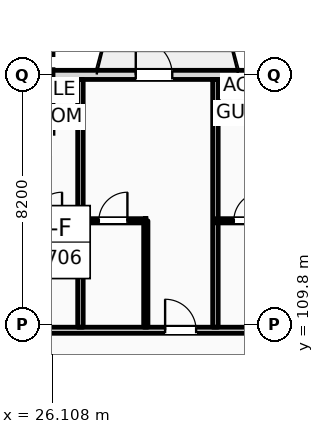
"""IFC4 building model, lengths in metres.
Left out: names, types, materials, properties, quantities, classifications, styles, units other than length and angle.
Written with IfcOpenShell. Run it as: python <this file> out.ifc"""

import sys

from ifc_helpers import new_model, si_unit, direction, frame, frame_2d, origin, place, context, subcontext, project, spatial, rectangle, extrude, element, fill, save


model = new_model("IFC4")
c1 = context("Model", 3, precision=1e-05, world=origin(), true_north=direction((0.0, 1.0)))
c2 = subcontext(c1, "Body", "Model", "MODEL_VIEW")
j1 = project(units=[si_unit("LENGTHUNIT", "METRE"), si_unit("PLANEANGLEUNIT", "RADIAN")], contexts=[c1])
p1 = place(None, origin())
s1 = spatial("IfcSite", under=j1, at=p1, CompositionType="ELEMENT")
p2 = place(p1, origin())
s2 = spatial("IfcBuilding", under=s1, at=p2, CompositionType="ELEMENT")
p3 = place(p2, frame((0.0, 0.0, 20.4)))
s3 = spatial("IfcBuildingStorey", under=s2, at=p3, CompositionType="ELEMENT", Elevation=20.4)
p4 = place(p3, frame((22.5, 118.0, 0.0), z_axis=(0.0, 0.0, 1.0), x_axis=(1.0, 0.0, 0.0)))
e1 = element("IfcWall", 1, at=p4, inside=s3, PredefinedType="STANDARD", context=c2, shape_type="SweptSolid", body=[
    extrude(rectangle(XDim=97.5, YDim=0.3, at=frame_2d((48.75, 0.0))), origin(), (0.0, 0.0, 1.0), 3.38),
])
p5 = place(p4, frame((0.91, 0.0, 0.9)))
e2 = element("IfcOpeningElement", 2, at=p5, cuts=e1, PredefinedType="OPENING", context=c2, shape_type="SweptSolid", body=[
    extrude(rectangle(XDim=0.9, YDim=1.8, at=frame_2d((0.45, 0.9))), frame((0.0, 0.16, 0.0), z_axis=(0.0, -1.0, 0.0), x_axis=(1.0, 0.0, 0.0)), (0.0, 0.0, 1.0), 0.32),
])
p6 = place(p4, frame((6.36, 0.0, 0.0)))
e3 = element("IfcOpeningElement", 3, at=p6, cuts=e1, PredefinedType="OPENING", context=c2, shape_type="SweptSolid", body=[
    extrude(rectangle(XDim=1.2, YDim=2.25, at=frame_2d((0.6, 1.125))), frame((0.0, 0.16, 0.0), z_axis=(0.0, -1.0, 0.0), x_axis=(1.0, 0.0, 0.0)), (0.0, 0.0, 1.0), 0.32),
])
p7 = place(p4, frame((11.41, 0.0, 0.9)))
e4 = element("IfcOpeningElement", 4, at=p7, cuts=e1, PredefinedType="OPENING", context=c2, shape_type="SweptSolid", body=[
    extrude(rectangle(XDim=1.1, YDim=1.9, at=frame_2d((0.55, 0.95))), frame((0.0, 0.16, 0.0), z_axis=(0.0, -1.0, 0.0), x_axis=(1.0, 0.0, 0.0)), (0.0, 0.0, 1.0), 0.32),
])
p8 = place(p4, frame((14.335, 0.0, 0.9)))
e5 = element("IfcOpeningElement", 5, at=p8, cuts=e1, PredefinedType="OPENING", context=c2, shape_type="SweptSolid", body=[
    extrude(rectangle(XDim=1.65, YDim=1.95, at=frame_2d((0.825, 0.975))), frame((0.0, 0.16, 0.0), z_axis=(0.0, -1.0, 0.0), x_axis=(1.0, 0.0, 0.0)), (0.0, 0.0, 1.0), 0.32),
])
p9 = place(p4, frame((19.26, 0.0, 0.9)))
e6 = element("IfcOpeningElement", 6, at=p9, cuts=e1, PredefinedType="OPENING", context=c2, shape_type="SweptSolid", body=[
    extrude(rectangle(XDim=1.35, YDim=2.0, at=frame_2d((0.675, 1.0))), frame((0.0, 0.16, 0.0), z_axis=(0.0, -1.0, 0.0), x_axis=(1.0, 0.0, 0.0)), (0.0, 0.0, 1.0), 0.32),
])
p10 = place(p4, frame((22.8, 0.0, 0.0)))
e7 = element("IfcOpeningElement", 7, at=p10, cuts=e1, PredefinedType="OPENING", context=c2, shape_type="SweptSolid", body=[
    extrude(rectangle(XDim=1.2, YDim=2.25, at=frame_2d((0.6, 1.125))), frame((0.0, 0.16, 0.0), z_axis=(0.0, -1.0, 0.0), x_axis=(1.0, 0.0, 0.0)), (0.0, 0.0, 1.0), 0.32),
])
p11 = place(p4, frame((26.91, 0.0, 0.9)))
e8 = element("IfcOpeningElement", 8, at=p11, cuts=e1, PredefinedType="OPENING", context=c2, shape_type="SweptSolid", body=[
    extrude(rectangle(XDim=2.1, YDim=2.1, at=frame_2d((1.05, 1.05))), frame((0.0, 0.16, 0.0), z_axis=(0.0, -1.0, 0.0), x_axis=(1.0, 0.0, 0.0)), (0.0, 0.0, 1.0), 0.32),
])
p12 = place(p4, frame((30.835, 0.0, 0.9)))
e9 = element("IfcOpeningElement", 9, at=p12, cuts=e1, PredefinedType="OPENING", context=c2, shape_type="SweptSolid", body=[
    extrude(rectangle(XDim=2.25, YDim=2.15, at=frame_2d((1.125, 1.075))), frame((0.0, 0.16, 0.0), z_axis=(0.0, -1.0, 0.0), x_axis=(1.0, 0.0, 0.0)), (0.0, 0.0, 1.0), 0.32),
])
p13 = place(p4, frame((34.96, 0.0, 0.9)))
e10 = element("IfcOpeningElement", 10, at=p13, cuts=e1, PredefinedType="OPENING", context=c2, shape_type="SweptSolid", body=[
    extrude(rectangle(XDim=2.4, YDim=2.2, at=frame_2d((1.2, 1.1))), frame((0.0, 0.16, 0.0), z_axis=(0.0, -1.0, 0.0), x_axis=(1.0, 0.0, 0.0)), (0.0, 0.0, 1.0), 0.32),
])
p14 = place(p4, frame((39.0, 0.0, 0.0)))
e11 = element("IfcOpeningElement", 11, at=p14, cuts=e1, PredefinedType="OPENING", context=c2, shape_type="SweptSolid", body=[
    extrude(rectangle(XDim=1.2, YDim=2.25, at=frame_2d((0.6, 1.125))), frame((0.0, 0.16, 0.0), z_axis=(0.0, -1.0, 0.0), x_axis=(1.0, 0.0, 0.0)), (0.0, 0.0, 1.0), 0.32),
])
p15 = place(p4, frame((43.21, 0.0, 0.9)))
e12 = element("IfcOpeningElement", 12, at=p15, cuts=e1, PredefinedType="OPENING", context=c2, shape_type="SweptSolid", body=[
    extrude(rectangle(XDim=2.7, YDim=2.3, at=frame_2d((1.35, 1.15))), frame((0.0, 0.16, 0.0), z_axis=(0.0, -1.0, 0.0), x_axis=(1.0, 0.0, 0.0)), (0.0, 0.0, 1.0), 0.32),
])
p16 = place(p4, frame((47.335, 0.0, 0.9)))
e13 = element("IfcOpeningElement", 13, at=p16, cuts=e1, PredefinedType="OPENING", context=c2, shape_type="SweptSolid", body=[
    extrude(rectangle(XDim=1.35, YDim=2.3, at=frame_2d((0.675, 1.15))), frame((0.0, 0.16, 0.0), z_axis=(0.0, -1.0, 0.0), x_axis=(1.0, 0.0, 0.0)), (0.0, 0.0, 1.0), 0.32),
])
p17 = place(p4, frame((52.74, 0.0, 0.0)))
e14 = element("IfcOpeningElement", 14, at=p17, cuts=e1, PredefinedType="OPENING", context=c2, shape_type="SweptSolid", body=[
    extrude(rectangle(XDim=1.2, YDim=2.25, at=frame_2d((0.6, 1.125))), frame((0.0, 0.16, 0.0), z_axis=(0.0, -1.0, 0.0), x_axis=(1.0, 0.0, 0.0)), (0.0, 0.0, 1.0), 0.32),
])
p18 = place(p4, frame((55.36, 0.0, 0.9)))
e15 = element("IfcOpeningElement", 15, at=p18, cuts=e1, PredefinedType="OPENING", context=c2, shape_type="SweptSolid", body=[
    extrude(rectangle(XDim=1.1, YDim=2.3, at=frame_2d((0.55, 1.15))), frame((0.0, 0.16, 0.0), z_axis=(0.0, -1.0, 0.0), x_axis=(1.0, 0.0, 0.0)), (0.0, 0.0, 1.0), 0.32),
])
p19 = place(p4, frame((59.99, 0.0, 0.9)))
e16 = element("IfcOpeningElement", 16, at=p19, cuts=e1, PredefinedType="OPENING", context=c2, shape_type="SweptSolid", body=[
    extrude(rectangle(XDim=2.74, YDim=2.3, at=frame_2d((1.37, 1.15))), frame((0.0, 0.16, 0.0), z_axis=(0.0, -1.0, 0.0), x_axis=(1.0, 0.0, 0.0)), (0.0, 0.0, 1.0), 0.32),
])
p20 = place(p4, frame((65.95, 0.0, 0.9)))
e17 = element("IfcOpeningElement", 17, at=p20, cuts=e1, PredefinedType="OPENING", context=c2, shape_type="SweptSolid", body=[
    extrude(rectangle(XDim=1.35, YDim=2.3, at=frame_2d((0.675, 1.15))), frame((0.0, 0.16, 0.0), z_axis=(0.0, -1.0, 0.0), x_axis=(1.0, 0.0, 0.0)), (0.0, 0.0, 1.0), 0.32),
])
p21 = place(p4, frame((69.16, 0.0, 0.0)))
e18 = element("IfcOpeningElement", 18, at=p21, cuts=e1, PredefinedType="OPENING", context=c2, shape_type="SweptSolid", body=[
    extrude(rectangle(XDim=1.2, YDim=2.25, at=frame_2d((0.6, 1.125))), frame((0.0, 0.16, 0.0), z_axis=(0.0, -1.0, 0.0), x_axis=(1.0, 0.0, 0.0)), (0.0, 0.0, 1.0), 0.32),
])
p22 = place(p4, frame((73.75, 0.0, 0.9)))
e19 = element("IfcOpeningElement", 19, at=p22, cuts=e1, PredefinedType="OPENING", context=c2, shape_type="SweptSolid", body=[
    extrude(rectangle(XDim=1.8, YDim=2.3, at=frame_2d((0.9, 1.15))), frame((0.0, 0.16, 0.0), z_axis=(0.0, -1.0, 0.0), x_axis=(1.0, 0.0, 0.0)), (0.0, 0.0, 1.0), 0.32),
])
p23 = place(p4, frame((76.79, 0.0, 0.9)))
e20 = element("IfcOpeningElement", 20, at=p23, cuts=e1, PredefinedType="OPENING", context=c2, shape_type="SweptSolid", body=[
    extrude(rectangle(XDim=2.74, YDim=2.3, at=frame_2d((1.37, 1.15))), frame((0.0, 0.16, 0.0), z_axis=(0.0, -1.0, 0.0), x_axis=(1.0, 0.0, 0.0)), (0.0, 0.0, 1.0), 0.32),
])
p24 = place(p4, frame((81.55, 0.0, 0.9)))
e21 = element("IfcOpeningElement", 21, at=p24, cuts=e1, PredefinedType="OPENING", context=c2, shape_type="SweptSolid", body=[
    extrude(rectangle(XDim=1.8, YDim=2.3, at=frame_2d((0.9, 1.15))), frame((0.0, 0.16, 0.0), z_axis=(0.0, -1.0, 0.0), x_axis=(1.0, 0.0, 0.0)), (0.0, 0.0, 1.0), 0.32),
])
p25 = place(p4, frame((86.01, 0.0, 0.9)))
e22 = element("IfcOpeningElement", 22, at=p25, cuts=e1, PredefinedType="OPENING", context=c2, shape_type="SweptSolid", body=[
    extrude(rectangle(XDim=1.1, YDim=1.5, at=frame_2d((0.55, 0.75))), frame((0.0, 0.16, 0.0), z_axis=(0.0, -1.0, 0.0), x_axis=(1.0, 0.0, 0.0)), (0.0, 0.0, 1.0), 0.32),
])
p26 = place(p4, frame((90.135, 0.0, 0.9)))
e23 = element("IfcOpeningElement", 23, at=p26, cuts=e1, PredefinedType="OPENING", context=c2, shape_type="SweptSolid", body=[
    extrude(rectangle(XDim=1.25, YDim=1.6, at=frame_2d((0.625, 0.8))), frame((0.0, 0.16, 0.0), z_axis=(0.0, -1.0, 0.0), x_axis=(1.0, 0.0, 0.0)), (0.0, 0.0, 1.0), 0.32),
])
p27 = place(p4, frame((94.34, 0.0, 0.9)))
e24 = element("IfcOpeningElement", 24, at=p27, cuts=e1, PredefinedType="OPENING", context=c2, shape_type="SweptSolid", body=[
    extrude(rectangle(XDim=1.4, YDim=1.7, at=frame_2d((0.7, 0.85))), frame((0.0, 0.16, 0.0), z_axis=(0.0, -1.0, 0.0), x_axis=(1.0, 0.0, 0.0)), (0.0, 0.0, 1.0), 0.32),
])
p28 = place(p3, frame((10.65, 109.6, 0.0), z_axis=(0.0, 0.0, 1.0), x_axis=(1.0, 0.0, 0.0)))
e25 = element("IfcWall", 25, at=p28, inside=s3, PredefinedType="PARTITIONING", context=c2, shape_type="SweptSolid", body=[
    extrude(rectangle(XDim=109.21, YDim=0.2, at=frame_2d((54.605, 0.0))), origin(), (0.0, 0.0, 1.0), 3.38),
])
p29 = place(p28, frame((12.535, 0.0, 0.0)))
e26 = element("IfcOpeningElement", 26, at=p29, cuts=e25, PredefinedType="OPENING", context=c2, shape_type="SweptSolid", body=[
    extrude(rectangle(XDim=1.02, YDim=2.2, at=frame_2d((0.51, 1.1))), frame((0.0, 0.11, 0.0), z_axis=(0.0, -1.0, 0.0), x_axis=(1.0, 0.0, 0.0)), (0.0, 0.0, 1.0), 0.22),
])
p30 = place(p28, frame((19.175, 0.0, 0.0)))
e27 = element("IfcOpeningElement", 27, at=p30, cuts=e25, PredefinedType="OPENING", context=c2, shape_type="SweptSolid", body=[
    extrude(rectangle(XDim=1.02, YDim=2.2, at=frame_2d((0.51, 1.1))), frame((0.0, 0.11, 0.0), z_axis=(0.0, -1.0, 0.0), x_axis=(1.0, 0.0, 0.0)), (0.0, 0.0, 1.0), 0.22),
])
p31 = place(p28, frame((23.375, 0.0, 0.0)))
e28 = element("IfcOpeningElement", 28, at=p31, cuts=e25, PredefinedType="OPENING", context=c2, shape_type="SweptSolid", body=[
    extrude(rectangle(XDim=1.02, YDim=2.2, at=frame_2d((0.51, 1.1))), frame((0.0, 0.11, 0.0), z_axis=(0.0, -1.0, 0.0), x_axis=(1.0, 0.0, 0.0)), (0.0, 0.0, 1.0), 0.22),
])
p32 = place(p28, frame((27.575, 0.0, 0.0)))
e29 = element("IfcOpeningElement", 29, at=p32, cuts=e25, PredefinedType="OPENING", context=c2, shape_type="SweptSolid", body=[
    extrude(rectangle(XDim=1.02, YDim=2.2, at=frame_2d((0.51, 1.1))), frame((0.0, 0.11, 0.0), z_axis=(0.0, -1.0, 0.0), x_axis=(1.0, 0.0, 0.0)), (0.0, 0.0, 1.0), 0.22),
])
p33 = place(p28, frame((31.805, 0.0, 0.0)))
e30 = element("IfcOpeningElement", 30, at=p33, cuts=e25, PredefinedType="OPENING", context=c2, shape_type="SweptSolid", body=[
    extrude(rectangle(XDim=0.96, YDim=2.2, at=frame_2d((0.48, 1.1))), frame((0.0, 0.11, 0.0), z_axis=(0.0, -1.0, 0.0), x_axis=(1.0, 0.0, 0.0)), (0.0, 0.0, 1.0), 0.22),
])
p34 = place(p28, frame((33.855, 0.0, 0.0)))
e31 = element("IfcOpeningElement", 31, at=p34, cuts=e25, PredefinedType="OPENING", context=c2, shape_type="SweptSolid", body=[
    extrude(rectangle(XDim=0.96, YDim=2.2, at=frame_2d((0.48, 1.1))), frame((0.0, 0.11, 0.0), z_axis=(0.0, -1.0, 0.0), x_axis=(1.0, 0.0, 0.0)), (0.0, 0.0, 1.0), 0.22),
])
p35 = place(p28, frame((40.205, 0.0, 0.0)))
e32 = element("IfcOpeningElement", 32, at=p35, cuts=e25, PredefinedType="OPENING", context=c2, shape_type="SweptSolid", body=[
    extrude(rectangle(XDim=0.96, YDim=2.2, at=frame_2d((0.48, 1.1))), frame((0.0, 0.11, 0.0), z_axis=(0.0, -1.0, 0.0), x_axis=(1.0, 0.0, 0.0)), (0.0, 0.0, 1.0), 0.22),
])
p36 = place(p28, frame((42.255, 0.0, 0.0)))
e33 = element("IfcOpeningElement", 33, at=p36, cuts=e25, PredefinedType="OPENING", context=c2, shape_type="SweptSolid", body=[
    extrude(rectangle(XDim=0.96, YDim=2.2, at=frame_2d((0.48, 1.1))), frame((0.0, 0.11, 0.0), z_axis=(0.0, -1.0, 0.0), x_axis=(1.0, 0.0, 0.0)), (0.0, 0.0, 1.0), 0.22),
])
p37 = place(p28, frame((48.605, 0.0, 0.0)))
e34 = element("IfcOpeningElement", 34, at=p37, cuts=e25, PredefinedType="OPENING", context=c2, shape_type="SweptSolid", body=[
    extrude(rectangle(XDim=0.96, YDim=2.2, at=frame_2d((0.48, 1.1))), frame((0.0, 0.11, 0.0), z_axis=(0.0, -1.0, 0.0), x_axis=(1.0, 0.0, 0.0)), (0.0, 0.0, 1.0), 0.22),
])
p38 = place(p28, frame((50.655, 0.0, 0.0)))
e35 = element("IfcOpeningElement", 35, at=p38, cuts=e25, PredefinedType="OPENING", context=c2, shape_type="SweptSolid", body=[
    extrude(rectangle(XDim=0.96, YDim=2.2, at=frame_2d((0.48, 1.1))), frame((0.0, 0.11, 0.0), z_axis=(0.0, -1.0, 0.0), x_axis=(1.0, 0.0, 0.0)), (0.0, 0.0, 1.0), 0.22),
])
p39 = place(p28, frame((57.005, 0.0, 0.0)))
e36 = element("IfcOpeningElement", 36, at=p39, cuts=e25, PredefinedType="OPENING", context=c2, shape_type="SweptSolid", body=[
    extrude(rectangle(XDim=0.96, YDim=2.2, at=frame_2d((0.48, 1.1))), frame((0.0, 0.11, 0.0), z_axis=(0.0, -1.0, 0.0), x_axis=(1.0, 0.0, 0.0)), (0.0, 0.0, 1.0), 0.22),
])
p40 = place(p28, frame((59.055, 0.0, 0.0)))
e37 = element("IfcOpeningElement", 37, at=p40, cuts=e25, PredefinedType="OPENING", context=c2, shape_type="SweptSolid", body=[
    extrude(rectangle(XDim=0.96, YDim=2.2, at=frame_2d((0.48, 1.1))), frame((0.0, 0.11, 0.0), z_axis=(0.0, -1.0, 0.0), x_axis=(1.0, 0.0, 0.0)), (0.0, 0.0, 1.0), 0.22),
])
p41 = place(p28, frame((65.405, 0.0, 0.0)))
e38 = element("IfcOpeningElement", 38, at=p41, cuts=e25, PredefinedType="OPENING", context=c2, shape_type="SweptSolid", body=[
    extrude(rectangle(XDim=0.96, YDim=2.2, at=frame_2d((0.48, 1.1))), frame((0.0, 0.11, 0.0), z_axis=(0.0, -1.0, 0.0), x_axis=(1.0, 0.0, 0.0)), (0.0, 0.0, 1.0), 0.22),
])
p42 = place(p28, frame((67.205, 0.0, 0.0)))
e39 = element("IfcOpeningElement", 39, at=p42, cuts=e25, PredefinedType="OPENING", context=c2, shape_type="SweptSolid", body=[
    extrude(rectangle(XDim=0.96, YDim=2.2, at=frame_2d((0.48, 1.1))), frame((0.0, 0.11, 0.0), z_axis=(0.0, -1.0, 0.0), x_axis=(1.0, 0.0, 0.0)), (0.0, 0.0, 1.0), 0.22),
])
p43 = place(p28, frame((73.805, 0.0, 0.0)))
e40 = element("IfcOpeningElement", 40, at=p43, cuts=e25, PredefinedType="OPENING", context=c2, shape_type="SweptSolid", body=[
    extrude(rectangle(XDim=0.96, YDim=2.2, at=frame_2d((0.48, 1.1))), frame((0.0, 0.11, 0.0), z_axis=(0.0, -1.0, 0.0), x_axis=(1.0, 0.0, 0.0)), (0.0, 0.0, 1.0), 0.22),
])
p44 = place(p28, frame((78.255, 0.0, 0.0)))
e41 = element("IfcOpeningElement", 41, at=p44, cuts=e25, PredefinedType="OPENING", context=c2, shape_type="SweptSolid", body=[
    extrude(rectangle(XDim=0.96, YDim=2.2, at=frame_2d((0.48, 1.1))), frame((0.0, 0.11, 0.0), z_axis=(0.0, -1.0, 0.0), x_axis=(1.0, 0.0, 0.0)), (0.0, 0.0, 1.0), 0.22),
])
p45 = place(p28, frame((82.205, 0.0, 0.0)))
e42 = element("IfcOpeningElement", 42, at=p45, cuts=e25, PredefinedType="OPENING", context=c2, shape_type="SweptSolid", body=[
    extrude(rectangle(XDim=0.96, YDim=2.2, at=frame_2d((0.48, 1.1))), frame((0.0, 0.11, 0.0), z_axis=(0.0, -1.0, 0.0), x_axis=(1.0, 0.0, 0.0)), (0.0, 0.0, 1.0), 0.22),
])
p46 = place(p28, frame((86.405, 0.0, 0.0)))
e43 = element("IfcOpeningElement", 43, at=p46, cuts=e25, PredefinedType="OPENING", context=c2, shape_type="SweptSolid", body=[
    extrude(rectangle(XDim=0.96, YDim=2.2, at=frame_2d((0.48, 1.1))), frame((0.0, 0.11, 0.0), z_axis=(0.0, -1.0, 0.0), x_axis=(1.0, 0.0, 0.0)), (0.0, 0.0, 1.0), 0.22),
])
p47 = place(p28, frame((90.605, 0.0, 0.0)))
e44 = element("IfcOpeningElement", 44, at=p47, cuts=e25, PredefinedType="OPENING", context=c2, shape_type="SweptSolid", body=[
    extrude(rectangle(XDim=0.96, YDim=2.2, at=frame_2d((0.48, 1.1))), frame((0.0, 0.11, 0.0), z_axis=(0.0, -1.0, 0.0), x_axis=(1.0, 0.0, 0.0)), (0.0, 0.0, 1.0), 0.22),
])
p48 = place(p28, frame((94.805, 0.0, 0.0)))
e45 = element("IfcOpeningElement", 45, at=p48, cuts=e25, PredefinedType="OPENING", context=c2, shape_type="SweptSolid", body=[
    extrude(rectangle(XDim=0.96, YDim=2.2, at=frame_2d((0.48, 1.1))), frame((0.0, 0.11, 0.0), z_axis=(0.0, -1.0, 0.0), x_axis=(1.0, 0.0, 0.0)), (0.0, 0.0, 1.0), 0.22),
])
p49 = place(p28, frame((99.005, 0.0, 0.0)))
e46 = element("IfcOpeningElement", 46, at=p49, cuts=e25, PredefinedType="OPENING", context=c2, shape_type="SweptSolid", body=[
    extrude(rectangle(XDim=0.96, YDim=2.2, at=frame_2d((0.48, 1.1))), frame((0.0, 0.11, 0.0), z_axis=(0.0, -1.0, 0.0), x_axis=(1.0, 0.0, 0.0)), (0.0, 0.0, 1.0), 0.22),
])
p50 = place(p28, frame((103.205, 0.0, 0.0)))
e47 = element("IfcOpeningElement", 47, at=p50, cuts=e25, PredefinedType="OPENING", context=c2, shape_type="SweptSolid", body=[
    extrude(rectangle(XDim=0.96, YDim=2.2, at=frame_2d((0.48, 1.1))), frame((0.0, 0.11, 0.0), z_axis=(0.0, -1.0, 0.0), x_axis=(1.0, 0.0, 0.0)), (0.0, 0.0, 1.0), 0.22),
])
p51 = place(p28, frame((105.335, 0.0, 0.0)))
e48 = element("IfcOpeningElement", 48, at=p51, cuts=e25, PredefinedType="OPENING", context=c2, shape_type="SweptSolid", body=[
    extrude(rectangle(XDim=0.96, YDim=2.2, at=frame_2d((0.48, 1.1))), frame((0.0, 0.11, 0.0), z_axis=(0.0, -1.0, 0.0), x_axis=(1.0, 0.0, 0.0)), (0.0, 0.0, 1.0), 0.22),
])
p52 = place(p28, frame((2.716, 0.0, 0.0)))
e49 = element("IfcOpeningElement", 49, at=p52, cuts=e25, PredefinedType="OPENING", context=c2, shape_type="SweptSolid", body=[
    extrude(rectangle(XDim=1.35, YDim=2.25, at=frame_2d((0.675, 1.125))), frame((0.0, 0.11, 0.0), z_axis=(0.0, -1.0, 0.0), x_axis=(1.0, 0.0, 0.0)), (0.0, 0.0, 1.0), 0.22),
])
p53 = place(p28, frame((6.65, 0.0, 0.0)))
e50 = element("IfcOpeningElement", 50, at=p53, cuts=e25, PredefinedType="OPENING", context=c2, shape_type="SweptSolid", body=[
    extrude(rectangle(XDim=1.35, YDim=2.25, at=frame_2d((0.675, 1.125))), frame((0.0, 0.11, 0.0), z_axis=(0.0, -1.0, 0.0), x_axis=(1.0, 0.0, 0.0)), (0.0, 0.0, 1.0), 0.22),
])
p54 = place(p28, frame((10.583, 0.0, 0.0)))
e51 = element("IfcOpeningElement", 51, at=p54, cuts=e25, PredefinedType="OPENING", context=c2, shape_type="SweptSolid", body=[
    extrude(rectangle(XDim=1.35, YDim=2.25, at=frame_2d((0.675, 1.125))), frame((0.0, 0.11, 0.0), z_axis=(0.0, -1.0, 0.0), x_axis=(1.0, 0.0, 0.0)), (0.0, 0.0, 1.0), 0.22),
])
p55 = place(p3, frame((27.04, 109.7, 0.0), z_axis=(0.0, 0.0, 1.0), x_axis=(0.0, 1.0, 0.0)))
e52 = element("IfcWall", 52, at=p55, inside=s3, PredefinedType="PARTITIONING", context=c2, shape_type="SweptSolid", body=[
    extrude(rectangle(XDim=8.15, YDim=0.18, at=frame_2d((4.075, 0.0))), origin(), (0.0, 0.0, 1.0), 3.94),
])
p56 = place(p3, frame((24.89, 113.2, 0.0), z_axis=(0.0, 0.0, 1.0), x_axis=(1.0, 0.0, 0.0)))
e53 = element("IfcWall", 53, at=p56, inside=s3, PredefinedType="PARTITIONING", context=c2, shape_type="SweptSolid", body=[
    extrude(rectangle(XDim=2.15, YDim=0.14, at=frame_2d((1.075, 0.0))), origin(), (0.0, 0.0, 1.0), 3.94),
])
p57 = place(p56, frame((0.605, 0.0, 0.0)))
e54 = element("IfcOpeningElement", 54, at=p57, cuts=e53, PredefinedType="OPENING", context=c2, shape_type="SweptSolid", body=[
    extrude(rectangle(XDim=0.94, YDim=2.15, at=frame_2d((0.47, 1.075))), frame((0.0, 0.08, 0.0), z_axis=(0.0, -1.0, 0.0), x_axis=(1.0, 0.0, 0.0)), (0.0, 0.0, 1.0), 0.16),
])
p58 = place(p3, frame((31.48, 109.7, 0.0), z_axis=(0.0, 0.0, 1.0), x_axis=(0.0, 1.0, 0.0)))
e55 = element("IfcWall", 55, at=p58, inside=s3, PredefinedType="PARTITIONING", context=c2, shape_type="SweptSolid", body=[
    extrude(rectangle(XDim=8.15, YDim=0.18, at=frame_2d((4.075, 0.0))), origin(), (0.0, 0.0, 1.0), 3.94),
])
p59 = place(p3, frame((29.19, 109.7, 0.0), z_axis=(0.0, 0.0, 1.0), x_axis=(0.0, 1.0, 0.0)))
e56 = element("IfcWall", 56, at=p59, inside=s3, PredefinedType="PARTITIONING", context=c2, shape_type="SweptSolid", body=[
    extrude(rectangle(XDim=3.5, YDim=0.14, at=frame_2d((1.75, 0.0))), origin(), (0.0, 0.0, 1.0), 3.94),
])
p60 = place(p3, frame((27.04, 113.2, 0.0), z_axis=(0.0, 0.0, 1.0), x_axis=(1.0, 0.0, 0.0)))
e57 = element("IfcWall", 57, at=p60, inside=s3, PredefinedType="PARTITIONING", context=c2, shape_type="SweptSolid", body=[
    extrude(rectangle(XDim=2.15, YDim=0.14, at=frame_2d((1.075, 0.0))), origin(), (0.0, 0.0, 1.0), 3.94),
])
p61 = place(p60, frame((0.605, 0.0, 0.0)))
e58 = element("IfcOpeningElement", 58, at=p61, cuts=e57, PredefinedType="OPENING", context=c2, shape_type="SweptSolid", body=[
    extrude(rectangle(XDim=0.94, YDim=2.15, at=frame_2d((0.47, 1.075))), frame((0.0, 0.08, 0.0), z_axis=(0.0, -1.0, 0.0), x_axis=(1.0, 0.0, 0.0)), (0.0, 0.0, 1.0), 0.16),
])
p62 = place(p3, frame((31.48, 113.2, 0.0), z_axis=(0.0, 0.0, 1.0), x_axis=(1.0, 0.0, 0.0)))
e59 = element("IfcWall", 59, at=p62, inside=s3, PredefinedType="PARTITIONING", context=c2, shape_type="SweptSolid", body=[
    extrude(rectangle(XDim=2.15, YDim=0.14, at=frame_2d((1.075, 0.0))), origin(), (0.0, 0.0, 1.0), 3.94),
])
p63 = place(p62, frame((0.605, 0.0, 0.0)))
e60 = element("IfcOpeningElement", 60, at=p63, cuts=e59, PredefinedType="OPENING", context=c2, shape_type="SweptSolid", body=[
    extrude(rectangle(XDim=0.94, YDim=2.15, at=frame_2d((0.47, 1.075))), frame((0.0, 0.08, 0.0), z_axis=(0.0, -1.0, 0.0), x_axis=(1.0, 0.0, 0.0)), (0.0, 0.0, 1.0), 0.16),
])
p64 = place(p6, origin())
e61 = element("IfcDoor", 61, at=p64, inside=s3, OperationType="SINGLE_SWING_LEFT", PredefinedType="DOOR", context=c2, shape_type="SweptSolid", body=[
    extrude(rectangle(XDim=1.2, YDim=2.25, at=frame_2d((0.6, 1.125))), frame((0.0, 0.025, 0.0), z_axis=(0.0, -1.0, 0.0), x_axis=(1.0, 0.0, 0.0)), (0.0, 0.0, 1.0), 0.05),
])
fill(e3, e61)
p65 = place(p57, origin())
e62 = element("IfcDoor", 62, at=p65, inside=s3, OperationType="SINGLE_SWING_RIGHT", PredefinedType="DOOR", context=c2, shape_type="SweptSolid", body=[
    extrude(rectangle(XDim=0.94, YDim=2.15, at=frame_2d((0.47, 1.075))), frame((0.0, 0.025, 0.0), z_axis=(0.0, -1.0, 0.0), x_axis=(1.0, 0.0, 0.0)), (0.0, 0.0, 1.0), 0.05),
])
fill(e54, e62)
p66 = place(p30, origin())
e63 = element("IfcDoor", 63, at=p66, inside=s3, OperationType="SINGLE_SWING_LEFT", PredefinedType="DOOR", context=c2, shape_type="SweptSolid", body=[
    extrude(rectangle(XDim=1.02, YDim=2.2, at=frame_2d((0.51, 1.1))), frame((0.0, 0.025, 0.0), z_axis=(0.0, -1.0, 0.0), x_axis=(1.0, 0.0, 0.0)), (0.0, 0.0, 1.0), 0.05),
])
fill(e27, e63)
p67 = place(p61, origin())
e64 = element("IfcDoor", 64, at=p67, inside=s3, OperationType="SINGLE_SWING_RIGHT", PredefinedType="DOOR", context=c2, shape_type="SweptSolid", body=[
    extrude(rectangle(XDim=0.94, YDim=2.15, at=frame_2d((0.47, 1.075))), frame((0.0, 0.025, 0.0), z_axis=(0.0, -1.0, 0.0), x_axis=(1.0, 0.0, 0.0)), (0.0, 0.0, 1.0), 0.05),
])
fill(e58, e64)
p68 = place(p63, origin())
e65 = element("IfcDoor", 65, at=p68, inside=s3, OperationType="SINGLE_SWING_RIGHT", PredefinedType="DOOR", context=c2, shape_type="SweptSolid", body=[
    extrude(rectangle(XDim=0.94, YDim=2.15, at=frame_2d((0.47, 1.075))), frame((0.0, 0.025, 0.0), z_axis=(0.0, -1.0, 0.0), x_axis=(1.0, 0.0, 0.0)), (0.0, 0.0, 1.0), 0.05),
])
fill(e60, e65)
save(model, sys.argv[1])
